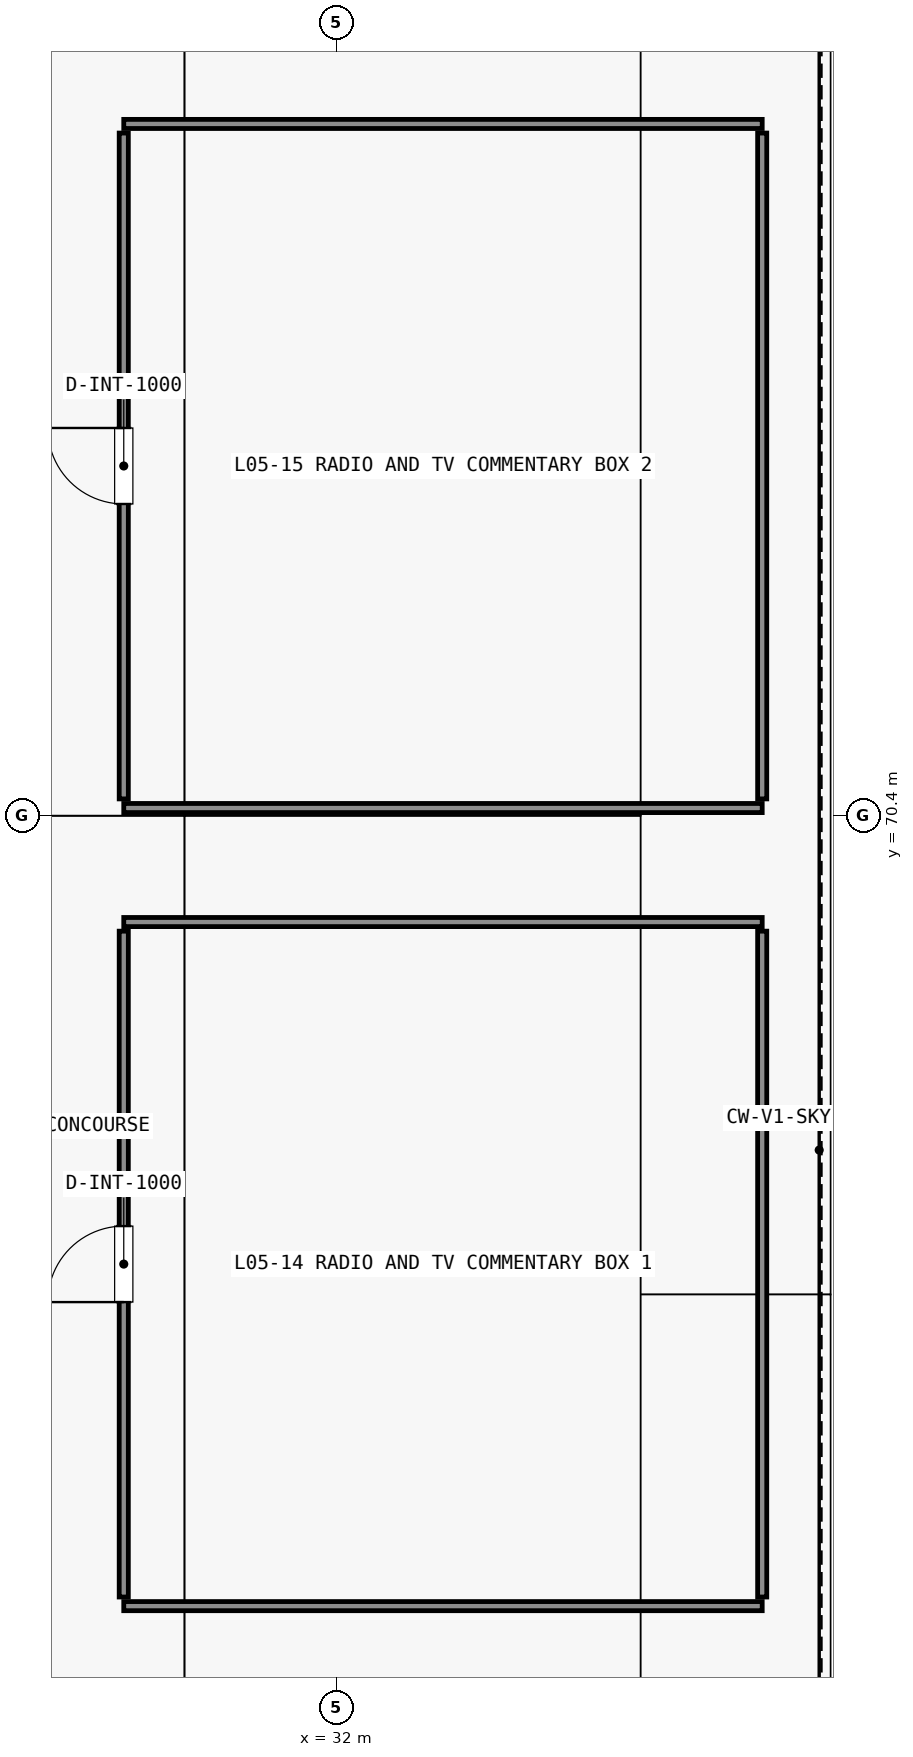
"""IFC4 building model, lengths in metres.
Left out: names, types, materials, properties, quantities, classifications, styles, units other than length and angle.
Written with IfcOpenShell. Run it as: python <this file> out.ifc"""

import sys

from ifc_helpers import new_model, si_unit, direction, frame, frame_2d, origin, place, context, subcontext, project, spatial, rectangle, extrude, element, fill, save


model = new_model("IFC4")
c1 = context("Model", 3, precision=1e-05, world=origin(), true_north=direction((0.0, 1.0)))
c2 = subcontext(c1, "Body", "Model", "MODEL_VIEW")
j1 = project(units=[si_unit("LENGTHUNIT", "METRE"), si_unit("PLANEANGLEUNIT", "RADIAN")], contexts=[c1])
p1 = place(None, origin())
s1 = spatial("IfcSite", under=j1, at=p1, CompositionType="ELEMENT")
p2 = place(p1, origin())
s2 = spatial("IfcBuilding", under=s1, at=p2, CompositionType="ELEMENT")
p3 = place(p2, frame((0.0, 0.0, 26.4)))
s3 = spatial("IfcBuildingStorey", under=s2, at=p3, CompositionType="ELEMENT", Elevation=26.4)
for number, where, z_axis, x_axis in (
    (1, (29.2, 60.0, 0.0), (0.0, 0.0, 1.0), (1.0, 0.0, 0.0)),
    (2, (29.2, 69.0, 0.0), (0.0, 0.0, 1.0), (1.0, 0.0, 0.0)),
):
    element("IfcWall", number, at=place(p3, frame(where, z_axis=z_axis, x_axis=x_axis)), inside=s3, PredefinedType="PARTITIONING", context=c2, shape_type="SweptSolid", body=[
        extrude(rectangle(XDim=8.4, YDim=0.12, at=frame_2d((4.2, 0.0))), origin(), (0.0, 0.0, 1.0), 5.18),
    ])
p4 = place(p3, frame((29.2, 60.12, 0.0), z_axis=(0.0, 0.0, 1.0), x_axis=(0.0, 1.0, 0.0)))
e3 = element("IfcWall", 3, at=p4, inside=s3, PredefinedType="PARTITIONING", context=c2, shape_type="SweptSolid", body=[
    extrude(rectangle(XDim=8.76, YDim=0.12, at=frame_2d((4.38, 0.0))), origin(), (0.0, 0.0, 1.0), 5.18),
])
p5 = place(p4, frame((3.88, 0.0, 0.0)))
e4 = element("IfcOpeningElement", 4, at=p5, cuts=e3, PredefinedType="OPENING", context=c2, shape_type="SweptSolid", body=[
    extrude(rectangle(XDim=1.0, YDim=2.15, at=frame_2d((0.5, 1.075))), frame((0.0, 0.07, 0.0), z_axis=(0.0, -1.0, 0.0), x_axis=(1.0, 0.0, 0.0)), (0.0, 0.0, 1.0), 0.14),
])
p6 = place(p3, frame((37.6, 60.12, 0.0), z_axis=(0.0, 0.0, 1.0), x_axis=(0.0, 1.0, 0.0)))
e5 = element("IfcWall", 5, at=p6, inside=s3, PredefinedType="PARTITIONING", context=c2, shape_type="SweptSolid", body=[
    extrude(rectangle(XDim=8.76, YDim=0.12, at=frame_2d((4.38, 0.0))), origin(), (0.0, 0.0, 1.0), 5.18),
])
for number, where, z_axis, x_axis in (
    (6, (29.2, 70.5, 0.0), (0.0, 0.0, 1.0), (1.0, 0.0, 0.0)),
    (7, (29.2, 79.5, 0.0), (0.0, 0.0, 1.0), (1.0, 0.0, 0.0)),
):
    element("IfcWall", number, at=place(p3, frame(where, z_axis=z_axis, x_axis=x_axis)), inside=s3, PredefinedType="PARTITIONING", context=c2, shape_type="SweptSolid", body=[
        extrude(rectangle(XDim=8.4, YDim=0.12, at=frame_2d((4.2, 0.0))), origin(), (0.0, 0.0, 1.0), 5.18),
    ])
p7 = place(p3, frame((29.2, 70.62, 0.0), z_axis=(0.0, 0.0, 1.0), x_axis=(0.0, 1.0, 0.0)))
e8 = element("IfcWall", 8, at=p7, inside=s3, PredefinedType="PARTITIONING", context=c2, shape_type="SweptSolid", body=[
    extrude(rectangle(XDim=8.76, YDim=0.12, at=frame_2d((4.38, 0.0))), origin(), (0.0, 0.0, 1.0), 5.18),
])
p8 = place(p7, frame((3.88, 0.0, 0.0)))
e9 = element("IfcOpeningElement", 9, at=p8, cuts=e8, PredefinedType="OPENING", context=c2, shape_type="SweptSolid", body=[
    extrude(rectangle(XDim=1.0, YDim=2.15, at=frame_2d((0.5, 1.075))), frame((0.0, 0.07, 0.0), z_axis=(0.0, -1.0, 0.0), x_axis=(1.0, 0.0, 0.0)), (0.0, 0.0, 1.0), 0.14),
])
p9 = place(p3, frame((37.6, 70.62, 0.0), z_axis=(0.0, 0.0, 1.0), x_axis=(0.0, 1.0, 0.0)))
e10 = element("IfcWall", 10, at=p9, inside=s3, PredefinedType="PARTITIONING", context=c2, shape_type="SweptSolid", body=[
    extrude(rectangle(XDim=8.76, YDim=0.12, at=frame_2d((4.38, 0.0))), origin(), (0.0, 0.0, 1.0), 5.18),
])
p10 = place(p5, origin())
e11 = element("IfcDoor", 11, at=p10, inside=s3, OperationType="SINGLE_SWING_LEFT", PredefinedType="DOOR", context=c2, shape_type="SweptSolid", body=[
    extrude(rectangle(XDim=1.0, YDim=2.15, at=frame_2d((0.5, 1.075))), frame((0.0, 0.025, 0.0), z_axis=(0.0, -1.0, 0.0), x_axis=(1.0, 0.0, 0.0)), (0.0, 0.0, 1.0), 0.05),
])
fill(e4, e11)
p11 = place(p8, origin())
e12 = element("IfcDoor", 12, at=p11, inside=s3, OperationType="SINGLE_SWING_RIGHT", PredefinedType="DOOR", context=c2, shape_type="SweptSolid", body=[
    extrude(rectangle(XDim=1.0, YDim=2.15, at=frame_2d((0.5, 1.075))), frame((0.0, 0.025, 0.0), z_axis=(0.0, -1.0, 0.0), x_axis=(1.0, 0.0, 0.0)), (0.0, 0.0, 1.0), 0.05),
])
fill(e9, e12)
save(model, sys.argv[1])
